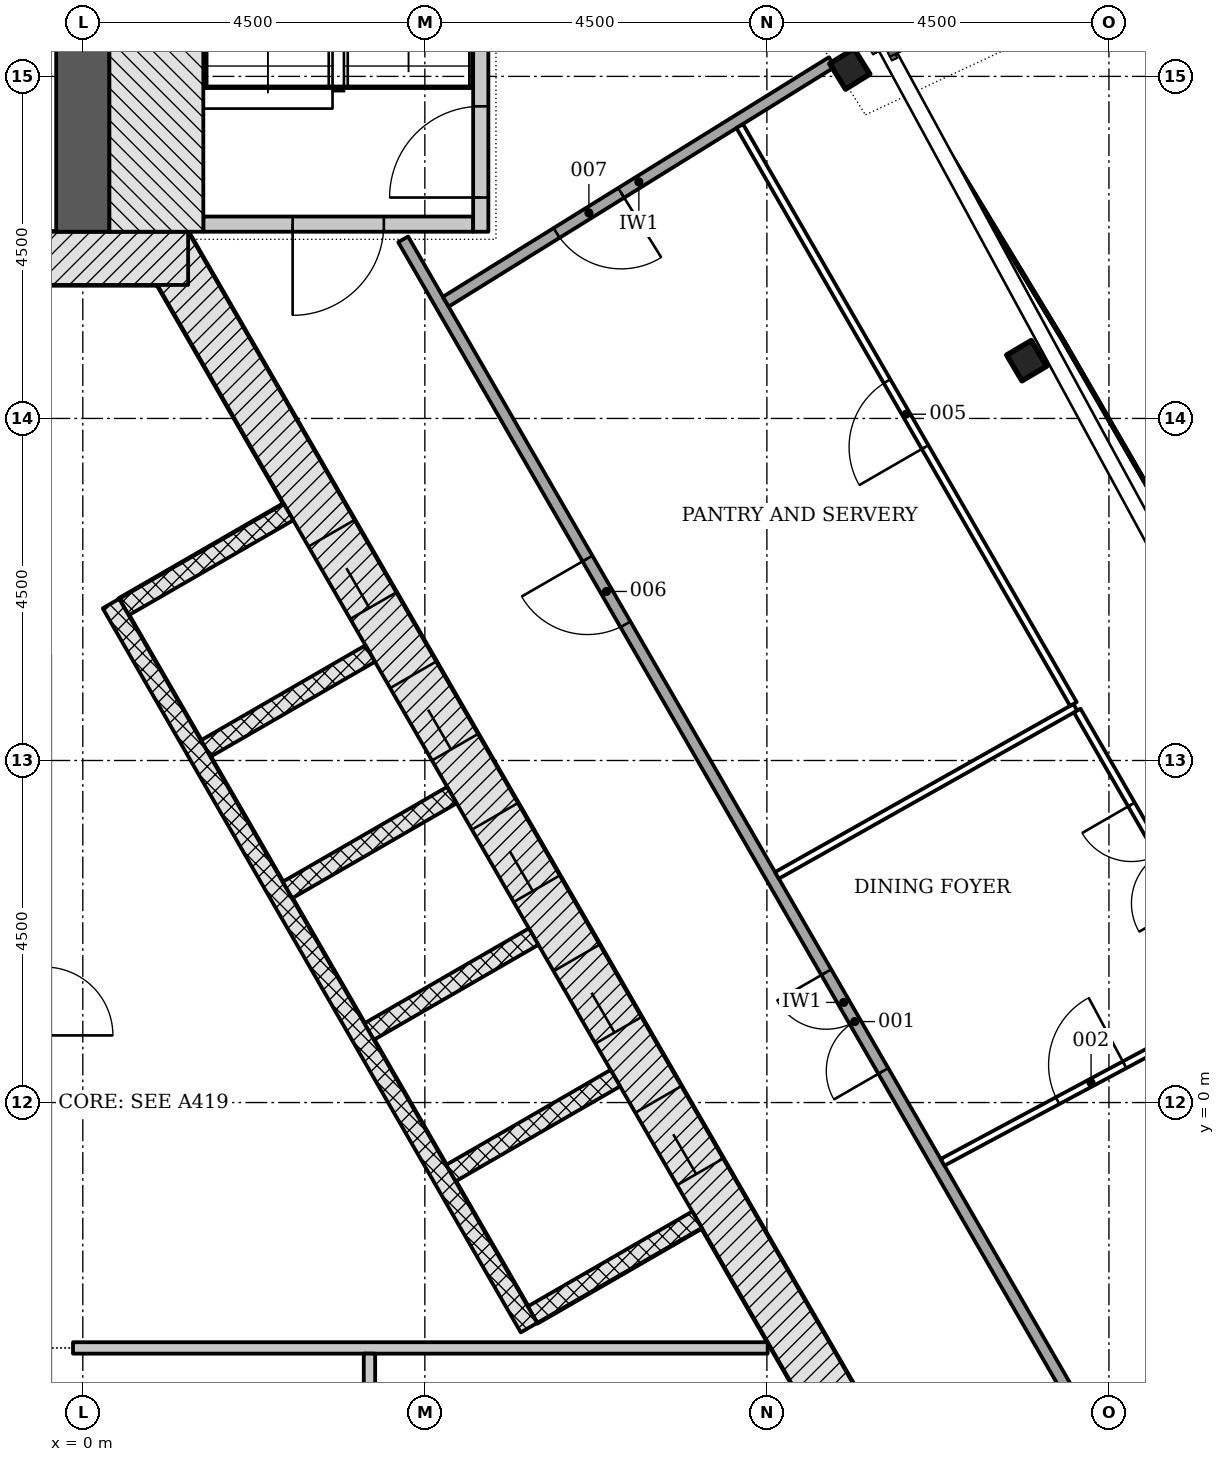
"""IFC4 building model, lengths in metres.
Left out: names, types, materials, properties, quantities, classifications, styles, units other than length and angle.
Written with IfcOpenShell. Run it as: python <this file> out.ifc"""

import sys

from ifc_helpers import new_model, si_unit, direction, frame, frame_2d, origin, origin_2d, place, context, subcontext, project, spatial, rectangle, i_section, extrude, element, fill, save


model = new_model("IFC4")
c1 = context("Model", 3, precision=1e-05, world=origin(), true_north=direction((0.0, 1.0)))
c2 = subcontext(c1, "Body", "Model", "MODEL_VIEW")
j1 = project(units=[si_unit("LENGTHUNIT", "METRE"), si_unit("PLANEANGLEUNIT", "RADIAN")], contexts=[c1])
p1 = place(None, origin())
s1 = spatial("IfcSite", under=j1, at=p1, CompositionType="ELEMENT")
p2 = place(p1, origin())
s2 = spatial("IfcBuilding", under=s1, at=p2, CompositionType="ELEMENT")
p3 = place(p2, frame((0.0, 0.0, 174.3)))
s3 = spatial("IfcBuildingStorey", under=s2, at=p3, CompositionType="ELEMENT", Elevation=174.3)
p4 = place(p3, frame((10.311, -4.703, -0.2), z_axis=(0.0, 0.0, 1.0), x_axis=(-0.500001446645, 0.866024568562, 0.0)))
e1 = element("IfcWall", 1, at=p4, inside=s3, PredefinedType="SHEAR", context=c2, shape_type="SweptSolid", body=[
    extrude(rectangle(XDim=18.458, YDim=0.7, at=frame_2d((9.229, 0.0))), origin(), (0.0, 0.0, 1.0), 3.6),
])
p5 = place(p4, frame((4.379, 0.0, 0.2)))
e2 = element("IfcOpeningElement", 2, at=p5, cuts=e1, PredefinedType="OPENING", context=c2, shape_type="SweptSolid", body=[
    extrude(rectangle(XDim=1.1, YDim=2.1, at=frame_2d((0.55, 1.05))), frame((0.0, 0.36, 0.0), z_axis=(0.0, -1.0, 0.0), x_axis=(1.0, 0.0, 0.0)), (0.0, 0.0, 1.0), 0.72),
])
p6 = place(p4, frame((6.529, 0.0, 0.2)))
e3 = element("IfcOpeningElement", 3, at=p6, cuts=e1, PredefinedType="OPENING", context=c2, shape_type="SweptSolid", body=[
    extrude(rectangle(XDim=1.1, YDim=2.1, at=frame_2d((0.55, 1.05))), frame((0.0, 0.36, 0.0), z_axis=(0.0, -1.0, 0.0), x_axis=(1.0, 0.0, 0.0)), (0.0, 0.0, 1.0), 0.72),
])
p7 = place(p4, frame((8.679, 0.0, 0.2)))
e4 = element("IfcOpeningElement", 4, at=p7, cuts=e1, PredefinedType="OPENING", context=c2, shape_type="SweptSolid", body=[
    extrude(rectangle(XDim=1.1, YDim=2.1, at=frame_2d((0.55, 1.05))), frame((0.0, 0.36, 0.0), z_axis=(0.0, -1.0, 0.0), x_axis=(1.0, 0.0, 0.0)), (0.0, 0.0, 1.0), 0.72),
])
p8 = place(p4, frame((10.829, 0.0, 0.2)))
e5 = element("IfcOpeningElement", 5, at=p8, cuts=e1, PredefinedType="OPENING", context=c2, shape_type="SweptSolid", body=[
    extrude(rectangle(XDim=1.1, YDim=2.1, at=frame_2d((0.55, 1.05))), frame((0.0, 0.36, 0.0), z_axis=(0.0, -1.0, 0.0), x_axis=(1.0, 0.0, 0.0)), (0.0, 0.0, 1.0), 0.72),
])
p9 = place(p4, frame((12.979, 0.0, 0.2)))
e6 = element("IfcOpeningElement", 6, at=p9, cuts=e1, PredefinedType="OPENING", context=c2, shape_type="SweptSolid", body=[
    extrude(rectangle(XDim=1.1, YDim=2.1, at=frame_2d((0.55, 1.05))), frame((0.0, 0.36, 0.0), z_axis=(0.0, -1.0, 0.0), x_axis=(1.0, 0.0, 0.0)), (0.0, 0.0, 1.0), 0.72),
])
p10 = place(p3, frame((1.386, 11.106, -0.2), z_axis=(0.0, 0.0, 1.0), x_axis=(-1.0, 0.0, 0.0)))
e7 = element("IfcWall", 7, at=p10, inside=s3, PredefinedType="SHEAR", context=c2, shape_type="SweptSolid", body=[
    extrude(rectangle(XDim=2.771, YDim=0.7, at=frame_2d((1.386, 0.0))), origin(), (0.0, 0.0, 1.0), 3.6),
])
p11 = place(p3, frame((0.0, 11.456, -0.2), z_axis=(0.0, 0.0, 1.0), x_axis=(0.0, 1.0, 0.0)))
e8 = element("IfcWall", 8, at=p11, inside=s3, PredefinedType="SHEAR", context=c2, shape_type="SweptSolid", body=[
    extrude(rectangle(XDim=9.928, YDim=0.7, at=frame_2d((4.964, 0.0))), origin(), (0.0, 0.0, 1.0), 3.6),
])
for number, where, z_axis, x_axis in (
    (9, (12.417, 9.76, -0.2), (0.0, 0.0, 1.0), (-0.509, 0.861, 0.0)),
    (10, (10.091, 13.599, -0.2), (0.0, 0.0, 1.0), (-0.527, 0.85, 0.0)),
):
    element("IfcColumn", number, at=place(p3, frame(where, z_axis=z_axis, x_axis=x_axis)), inside=s3, PredefinedType="COLUMN", context=c2, shape_type="SweptSolid", body=[
        extrude(i_section(OverallWidth=0.394, OverallDepth=0.376, WebThickness=0.017, FlangeThickness=0.028, FilletRadius=0.015, at=origin_2d()), origin(), (0.0, 0.0, 1.0), 3.6),
    ])
for number, where, z_axis, x_axis in (
    (11, (8.081, -1.541, -0.2), (0.0, 0.0, 1.0), (-0.866, -0.5, 0.0)),
    (12, (7.006, 0.321, -0.2), (0.0, 0.0, 1.0), (-0.866, -0.5, 0.0)),
):
    element("IfcWall", number, at=place(p3, frame(where, z_axis=z_axis, x_axis=x_axis)), inside=s3, PredefinedType="PARTITIONING", context=c2, shape_type="SweptSolid", body=[
        extrude(rectangle(XDim=2.5, YDim=0.25, at=frame_2d((1.25, 0.0))), origin(), (0.0, 0.0, 1.0), 3.6),
    ])
p12 = place(p3, frame((5.931, 2.183, -0.2), z_axis=(0.0, 0.0, 1.0), x_axis=(-0.866047370643, -0.499961950354, 0.0)))
e13 = element("IfcWall", 13, at=p12, inside=s3, PredefinedType="PARTITIONING", context=c2, shape_type="SweptSolid", body=[
    extrude(rectangle(XDim=2.5, YDim=0.25, at=frame_2d((1.25, 0.0))), origin(), (0.0, 0.0, 1.0), 3.6),
])
for number, where, z_axis, x_axis in (
    (14, (4.856, 4.045, -0.2), (0.0, 0.0, 1.0), (-0.866, -0.5, 0.0)),
    (15, (3.781, 5.907, -0.2), (0.0, 0.0, 1.0), (-0.866, -0.5, 0.0)),
    (16, (2.706, 7.769, -0.2), (0.0, 0.0, 1.0), (-0.866, -0.5, 0.0)),
):
    element("IfcWall", number, at=place(p3, frame(where, z_axis=z_axis, x_axis=x_axis)), inside=s3, PredefinedType="PARTITIONING", context=c2, shape_type="SweptSolid", body=[
        extrude(rectangle(XDim=2.5, YDim=0.25, at=frame_2d((1.25, 0.0))), origin(), (0.0, 0.0, 1.0), 3.6),
    ])
p13 = place(p3, frame((5.87, -2.961, 0.0), z_axis=(0.0, 0.0, 1.0), x_axis=(-0.50000615651, 0.866021849293, 0.0)))
e17 = element("IfcWall", 17, at=p13, inside=s3, PredefinedType="PARTITIONING", context=c2, shape_type="SweptSolid", body=[
    extrude(rectangle(XDim=11.0, YDim=0.25, at=frame_2d((5.5, 0.0))), origin(), (0.0, 0.0, 1.0), 3.4),
])
p14 = place(p3, frame((-0.129, -3.228, 0.0), z_axis=(0.0, 0.0, 1.0), x_axis=(1.0, 0.0, 0.0)))
e18 = element("IfcWall", 18, at=p14, inside=s3, PredefinedType="PARTITIONING", context=c2, shape_type="SweptSolid", body=[
    extrude(rectangle(XDim=9.139, YDim=0.15, at=frame_2d((4.57, 0.0))), origin(), (0.0, 0.0, 1.0), 3.4),
])
p15 = place(p3, frame((3.771, -3.303, 0.0), z_axis=(0.0, 0.0, 1.0), x_axis=(0.0, -1.0, 0.0)))
e19 = element("IfcWall", 19, at=p15, inside=s3, PredefinedType="PARTITIONING", context=c2, shape_type="SweptSolid", body=[
    extrude(rectangle(XDim=2.925, YDim=0.15, at=frame_2d((1.462, 0.0))), origin(), (0.0, 0.0, 1.0), 3.4),
])
p16 = place(p3, frame((5.135, 11.556, -0.2), z_axis=(0.0, 0.0, 1.0), x_axis=(-1.0, 0.0, 0.0)))
e20 = element("IfcWall", 20, at=p16, inside=s3, PredefinedType="SHEAR", context=c2, shape_type="SweptSolid", body=[
    extrude(rectangle(XDim=3.55, YDim=0.2, at=frame_2d((1.775, 0.0))), origin(), (0.0, 0.0, 1.0), 3.6),
])
p17 = place(p16, frame((1.175, 0.0, 0.2)))
e21 = element("IfcOpeningElement", 21, at=p17, cuts=e20, PredefinedType="OPENING", context=c2, shape_type="SweptSolid", body=[
    extrude(rectangle(XDim=1.2, YDim=2.1, at=frame_2d((0.6, 1.05))), frame((0.0, 0.11, 0.0), z_axis=(0.0, -1.0, 0.0), x_axis=(1.0, 0.0, 0.0)), (0.0, 0.0, 1.0), 0.22),
])
p18 = place(p3, frame((5.236, 11.456, -0.2), z_axis=(0.0, 0.0, 1.0), x_axis=(0.0, 1.0, 0.0)))
e22 = element("IfcWall", 22, at=p18, inside=s3, PredefinedType="SHEAR", context=c2, shape_type="SweptSolid", body=[
    extrude(rectangle(XDim=5.6, YDim=0.2, at=frame_2d((2.8, 0.0))), origin(), (0.0, 0.0, 1.0), 3.6),
])
p19 = place(p18, frame((0.45, 0.0, 0.2)))
e23 = element("IfcOpeningElement", 23, at=p19, cuts=e22, PredefinedType="OPENING", context=c2, shape_type="SweptSolid", body=[
    extrude(rectangle(XDim=1.2, YDim=2.1, at=frame_2d((0.6, 1.05))), frame((0.0, 0.11, 0.0), z_axis=(0.0, -1.0, 0.0), x_axis=(1.0, 0.0, 0.0)), (0.0, 0.0, 1.0), 0.22),
])
p20 = place(p3, frame((0.968, 11.456, -0.2), z_axis=(0.0, 0.0, 1.0), x_axis=(0.0, 1.0, 0.0)))
e24 = element("IfcWall", 24, at=p20, inside=s3, PredefinedType="SHEAR", context=c2, shape_type="SweptSolid", body=[
    extrude(rectangle(XDim=7.2, YDim=1.236, at=frame_2d((3.6, 0.0))), origin(), (0.0, 0.0, 1.0), 3.6),
])
p21 = place(p3, frame((15.807, -8.722, 0.0), z_axis=(0.0, 0.0, 1.0), x_axis=(-0.500001078133, 0.866024781323, 0.0)))
e25 = element("IfcWall", 25, at=p21, inside=s3, PredefinedType="PARTITIONING", context=c2, shape_type="SweptSolid", body=[
    extrude(rectangle(XDim=23.185, YDim=0.15, at=frame_2d((11.592, 0.0))), origin(), (0.0, 0.0, 1.0), 2.847),
])
p22 = place(p21, frame((10.551, 0.0, 0.0)))
e26 = element("IfcOpeningElement", 26, at=p22, cuts=e25, PredefinedType="OPENING", context=c2, shape_type="SweptSolid", body=[
    extrude(rectangle(XDim=1.5, YDim=2.1, at=frame_2d((0.75, 1.05))), frame((0.0, 0.085, 0.0), z_axis=(0.0, -1.0, 0.0), x_axis=(1.0, 0.0, 0.0)), (0.0, 0.0, 1.0), 0.17),
])
p23 = place(p21, frame((17.335, 0.0, 0.0)))
e27 = element("IfcOpeningElement", 27, at=p23, cuts=e25, PredefinedType="OPENING", context=c2, shape_type="SweptSolid", body=[
    extrude(rectangle(XDim=1.0, YDim=2.1, at=frame_2d((0.5, 1.05))), frame((0.0, 0.085, 0.0), z_axis=(0.0, -1.0, 0.0), x_axis=(1.0, 0.0, 0.0)), (0.0, 0.0, 1.0), 0.17),
])
p24 = place(p3, frame((9.856, 13.688, 0.0), z_axis=(0.0, 0.0, 1.0), x_axis=(-0.849698198213, -0.527269354271, 0.0)))
e28 = element("IfcWall", 28, at=p24, inside=s3, PredefinedType="PARTITIONING", context=c2, shape_type="SweptSolid", body=[
    extrude(rectangle(XDim=5.979, YDim=0.15, at=frame_2d((2.99, 0.0))), origin(), (0.0, 0.0, 1.0), 3.4),
])
p25 = place(p24, frame((3.264, 0.0, 0.0)))
e29 = element("IfcOpeningElement", 29, at=p25, cuts=e28, PredefinedType="OPENING", context=c2, shape_type="SweptSolid", body=[
    extrude(rectangle(XDim=1.0, YDim=2.1, at=frame_2d((0.5, 1.05))), frame((0.0, 0.085, 0.0), z_axis=(0.0, -1.0, 0.0), x_axis=(1.0, 0.0, 0.0)), (0.0, 0.0, 1.0), 0.17),
])
p26 = place(p3, frame((11.312, -0.786, 0.0), z_axis=(0.0, 0.0, 1.0), x_axis=(0.881471822947, 0.472236620087, 0.0)))
e30 = element("IfcWall", 30, at=p26, inside=s3, PredefinedType="PARTITIONING", context=c2, shape_type="SweptSolid", body=[
    extrude(rectangle(XDim=23.611, YDim=0.1, at=frame_2d((11.806, 0.0))), origin(), (0.0, 0.0, 1.0), 2.847),
])
p27 = place(p26, frame((1.716, 0.0, 0.0)))
e31 = element("IfcOpeningElement", 31, at=p27, cuts=e30, PredefinedType="OPENING", context=c2, shape_type="SweptSolid", body=[
    extrude(rectangle(XDim=1.0, YDim=2.1, at=frame_2d((0.5, 1.05))), frame((0.0, 0.06, 0.0), z_axis=(0.0, -1.0, 0.0), x_axis=(1.0, 0.0, 0.0)), (0.0, 0.0, 1.0), 0.12),
])
p28 = place(p26, frame((13.002, 0.0, 0.0)))
e32 = element("IfcOpeningElement", 32, at=p28, cuts=e30, PredefinedType="OPENING", context=c2, shape_type="SweptSolid", body=[
    extrude(rectangle(XDim=1.5, YDim=2.1, at=frame_2d((0.75, 1.05))), frame((0.0, 0.06, 0.0), z_axis=(0.0, -1.0, 0.0), x_axis=(1.0, 0.0, 0.0)), (0.0, 0.0, 1.0), 0.12),
])
p29 = place(p3, frame((9.133, 2.989, 0.0), z_axis=(0.0, 0.0, 1.0), x_axis=(0.871281573597, 0.490783475181, 0.0)))
e33 = element("IfcWall", 33, at=p29, inside=s3, PredefinedType="PARTITIONING", context=c2, shape_type="SweptSolid", body=[
    extrude(rectangle(XDim=4.505, YDim=0.1, at=frame_2d((2.252, 0.0))), origin(), (0.0, 0.0, 1.0), 3.4),
])
p30 = place(p3, frame((15.259, 1.386, 0.0), z_axis=(0.0, 0.0, 1.0), x_axis=(-0.499999150107, 0.86602589447, 0.0)))
e34 = element("IfcWall", 34, at=p30, inside=s3, PredefinedType="PARTITIONING", context=c2, shape_type="SweptSolid", body=[
    extrude(rectangle(XDim=4.354, YDim=0.1, at=frame_2d((2.177, 0.0))), origin(), (0.0, 0.0, 1.0), 2.847),
])
p31 = place(p30, frame((1.427, 0.0, 0.0)))
e35 = element("IfcOpeningElement", 35, at=p31, cuts=e34, PredefinedType="OPENING", context=c2, shape_type="SweptSolid", body=[
    extrude(rectangle(XDim=1.5, YDim=2.1, at=frame_2d((0.75, 1.05))), frame((0.0, 0.06, 0.0), z_axis=(0.0, -1.0, 0.0), x_axis=(1.0, 0.0, 0.0)), (0.0, 0.0, 1.0), 0.12),
])
p32 = place(p3, frame((13.032, 5.243, 0.0), z_axis=(0.0, 0.0, 1.0), x_axis=(-0.499996840937, 0.866027227663, 0.0)))
e36 = element("IfcWall", 36, at=p32, inside=s3, PredefinedType="PARTITIONING", context=c2, shape_type="SweptSolid", body=[
    extrude(rectangle(XDim=8.78, YDim=0.1, at=frame_2d((4.39, 0.0))), origin(), (0.0, 0.0, 1.0), 2.847),
])
p33 = place(p32, frame((3.903, 0.0, 0.0)))
e37 = element("IfcOpeningElement", 37, at=p33, cuts=e36, PredefinedType="OPENING", context=c2, shape_type="SweptSolid", body=[
    extrude(rectangle(XDim=1.0, YDim=2.1, at=frame_2d((0.5, 1.05))), frame((0.0, 0.06, 0.0), z_axis=(0.0, -1.0, 0.0), x_axis=(1.0, 0.0, 0.0)), (0.0, 0.0, 1.0), 0.12),
])
p34 = place(p3, frame((-0.35, 18.85, 0.0), z_axis=(0.0, 0.0, 1.0), x_axis=(-0.499985463203, -0.866033796445, 0.0)))
e38 = element("IfcWall", 38, at=p34, inside=s3, PredefinedType="PARTITIONING", context=c2, shape_type="SweptSolid", body=[
    extrude(rectangle(XDim=9.803, YDim=0.15, at=frame_2d((4.901, 0.0))), origin(), (0.0, 0.0, 1.0), 2.847),
])
p35 = place(p5, origin())
e39 = element("IfcDoor", 39, at=p35, inside=s3, OperationType="DOUBLE_DOOR_SLIDING", PredefinedType="DOOR", context=c2, shape_type="SweptSolid", body=[
    extrude(rectangle(XDim=1.1, YDim=2.1, at=frame_2d((0.55, 1.05))), frame((0.0, 0.025, 0.0), z_axis=(0.0, -1.0, 0.0), x_axis=(1.0, 0.0, 0.0)), (0.0, 0.0, 1.0), 0.05),
])
fill(e2, e39)
p36 = place(p6, origin())
e40 = element("IfcDoor", 40, at=p36, inside=s3, OperationType="DOUBLE_DOOR_SLIDING", PredefinedType="DOOR", context=c2, shape_type="SweptSolid", body=[
    extrude(rectangle(XDim=1.1, YDim=2.1, at=frame_2d((0.55, 1.05))), frame((0.0, 0.025, 0.0), z_axis=(0.0, -1.0, 0.0), x_axis=(1.0, 0.0, 0.0)), (0.0, 0.0, 1.0), 0.05),
])
fill(e3, e40)
p37 = place(p7, origin())
e41 = element("IfcDoor", 41, at=p37, inside=s3, OperationType="DOUBLE_DOOR_SLIDING", PredefinedType="DOOR", context=c2, shape_type="SweptSolid", body=[
    extrude(rectangle(XDim=1.1, YDim=2.1, at=frame_2d((0.55, 1.05))), frame((0.0, 0.025, 0.0), z_axis=(0.0, -1.0, 0.0), x_axis=(1.0, 0.0, 0.0)), (0.0, 0.0, 1.0), 0.05),
])
fill(e4, e41)
p38 = place(p8, origin())
e42 = element("IfcDoor", 42, at=p38, inside=s3, OperationType="DOUBLE_DOOR_SLIDING", PredefinedType="DOOR", context=c2, shape_type="SweptSolid", body=[
    extrude(rectangle(XDim=1.1, YDim=2.1, at=frame_2d((0.55, 1.05))), frame((0.0, 0.025, 0.0), z_axis=(0.0, -1.0, 0.0), x_axis=(1.0, 0.0, 0.0)), (0.0, 0.0, 1.0), 0.05),
])
fill(e5, e42)
p39 = place(p9, origin())
e43 = element("IfcDoor", 43, at=p39, inside=s3, OperationType="DOUBLE_DOOR_SLIDING", PredefinedType="DOOR", context=c2, shape_type="SweptSolid", body=[
    extrude(rectangle(XDim=1.1, YDim=2.1, at=frame_2d((0.55, 1.05))), frame((0.0, 0.025, 0.0), z_axis=(0.0, -1.0, 0.0), x_axis=(1.0, 0.0, 0.0)), (0.0, 0.0, 1.0), 0.05),
])
fill(e6, e43)
p40 = place(p17, origin())
e44 = element("IfcDoor", 44, at=p40, inside=s3, OperationType="SINGLE_SWING_RIGHT", PredefinedType="DOOR", context=c2, shape_type="SweptSolid", body=[
    extrude(rectangle(XDim=1.2, YDim=2.1, at=frame_2d((0.6, 1.05))), frame((0.0, 0.025, 0.0), z_axis=(0.0, -1.0, 0.0), x_axis=(1.0, 0.0, 0.0)), (0.0, 0.0, 1.0), 0.05),
])
fill(e21, e44)
p41 = place(p19, origin())
e45 = element("IfcDoor", 45, at=p41, inside=s3, OperationType="SINGLE_SWING_LEFT", PredefinedType="DOOR", context=c2, shape_type="SweptSolid", body=[
    extrude(rectangle(XDim=1.2, YDim=2.1, at=frame_2d((0.6, 1.05))), frame((0.0, 0.025, 0.0), z_axis=(0.0, -1.0, 0.0), x_axis=(1.0, 0.0, 0.0)), (0.0, 0.0, 1.0), 0.05),
])
fill(e23, e45)
p42 = place(p22, origin())
e46 = element("IfcDoor", 46, at=p42, inside=s3, OperationType="DOUBLE_DOOR_SINGLE_SWING", PredefinedType="DOOR", context=c2, shape_type="SweptSolid", body=[
    extrude(rectangle(XDim=1.5, YDim=2.1, at=frame_2d((0.75, 1.05))), frame((0.0, 0.025, 0.0), z_axis=(0.0, -1.0, 0.0), x_axis=(1.0, 0.0, 0.0)), (0.0, 0.0, 1.0), 0.05),
])
fill(e26, e46)
p43 = place(p27, origin())
e47 = element("IfcDoor", 47, at=p43, inside=s3, OperationType="SINGLE_SWING_RIGHT", PredefinedType="DOOR", context=c2, shape_type="SweptSolid", body=[
    extrude(rectangle(XDim=1.0, YDim=2.1, at=frame_2d((0.5, 1.05))), frame((0.0, 0.025, 0.0), z_axis=(0.0, -1.0, 0.0), x_axis=(1.0, 0.0, 0.0)), (0.0, 0.0, 1.0), 0.05),
])
fill(e31, e47)
p44 = place(p31, origin())
e48 = element("IfcDoor", 48, at=p44, inside=s3, OperationType="DOUBLE_DOOR_SINGLE_SWING", PredefinedType="DOOR", context=c2, shape_type="SweptSolid", body=[
    extrude(rectangle(XDim=1.5, YDim=2.1, at=frame_2d((0.75, 1.05))), frame((0.0, 0.025, 0.0), z_axis=(0.0, -1.0, 0.0), x_axis=(1.0, 0.0, 0.0)), (0.0, 0.0, 1.0), 0.05),
])
fill(e35, e48)
p45 = place(p33, origin())
e49 = element("IfcDoor", 49, at=p45, inside=s3, OperationType="SINGLE_SWING_LEFT", PredefinedType="DOOR", context=c2, shape_type="SweptSolid", body=[
    extrude(rectangle(XDim=1.0, YDim=2.1, at=frame_2d((0.5, 1.05))), frame((0.0, 0.025, 0.0), z_axis=(0.0, -1.0, 0.0), x_axis=(1.0, 0.0, 0.0)), (0.0, 0.0, 1.0), 0.05),
])
fill(e37, e49)
p46 = place(p23, origin())
e50 = element("IfcDoor", 50, at=p46, inside=s3, OperationType="SINGLE_SWING_RIGHT", PredefinedType="DOOR", context=c2, shape_type="SweptSolid", body=[
    extrude(rectangle(XDim=1.0, YDim=2.1, at=frame_2d((0.5, 1.05))), frame((0.0, 0.025, 0.0), z_axis=(0.0, -1.0, 0.0), x_axis=(1.0, 0.0, 0.0)), (0.0, 0.0, 1.0), 0.05),
])
fill(e27, e50)
p47 = place(p25, origin())
e51 = element("IfcDoor", 51, at=p47, inside=s3, OperationType="SINGLE_SWING_LEFT", PredefinedType="DOOR", context=c2, shape_type="SweptSolid", body=[
    extrude(rectangle(XDim=1.0, YDim=2.1, at=frame_2d((0.5, 1.05))), frame((0.0, 0.025, 0.0), z_axis=(0.0, -1.0, 0.0), x_axis=(1.0, 0.0, 0.0)), (0.0, 0.0, 1.0), 0.05),
])
fill(e29, e51)
save(model, sys.argv[1])
